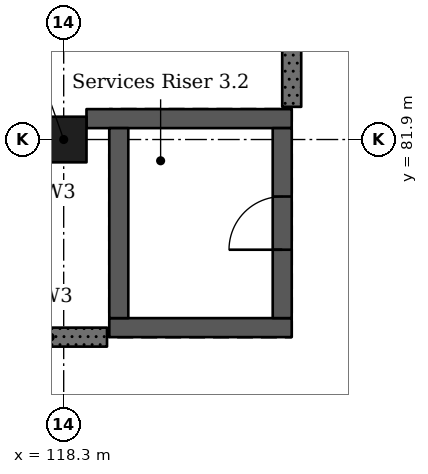
"""IFC4 building model, lengths in metres.
Left out: names, types, materials, properties, quantities, classifications, styles, units other than length and angle.
Written with IfcOpenShell. Run it as: python <this file> out.ifc"""

import sys

from ifc_helpers import new_model, si_unit, direction, frame, frame_2d, origin, origin_2d, place, context, subcontext, project, spatial, rectangle, extrude, element, fill, save


model = new_model("IFC4")
c1 = context("Model", 3, precision=1e-05, world=origin(), true_north=direction((0.0, 1.0)))
c2 = subcontext(c1, "Body", "Model", "MODEL_VIEW")
j1 = project(units=[si_unit("LENGTHUNIT", "METRE"), si_unit("PLANEANGLEUNIT", "RADIAN")], contexts=[c1])
p1 = place(None, origin())
s1 = spatial("IfcSite", under=j1, at=p1, CompositionType="ELEMENT")
p2 = place(p1, origin())
s2 = spatial("IfcBuilding", under=s1, at=p2, CompositionType="ELEMENT")
p3 = place(p2, frame((0.0, 0.0, 20.02)))
s3 = spatial("IfcBuildingStorey", under=s2, at=p3, CompositionType="ELEMENT", Elevation=20.02)
p4 = place(p3, frame((118.3, 81.9, 0.0), z_axis=(0.0, 0.0, 1.0), x_axis=(1.0, 0.0, 0.0)))
e1 = element("IfcColumn", 1, at=p4, inside=s3, PredefinedType="COLUMN", context=c2, shape_type="SweptSolid", body=[
    extrude(rectangle(XDim=0.6, YDim=0.6, at=origin_2d()), origin(), (0.0, 0.0, 1.0), 4.55),
])
p5 = place(p3, frame((121.3, 79.425, 0.0), z_axis=(0.0, 0.0, 1.0), x_axis=(-1.0, 0.0, 0.0)))
e2 = element("IfcWall", 2, at=p5, inside=s3, PredefinedType="SHEAR", context=c2, shape_type="SweptSolid", body=[
    extrude(rectangle(XDim=2.4, YDim=0.25, at=frame_2d((1.2, 0.0))), origin(), (0.0, 0.0, 1.0), 4.55),
])
p6 = place(p3, frame((121.3, 82.175, 0.0), z_axis=(0.0, 0.0, 1.0), x_axis=(-1.0, 0.0, 0.0)))
e3 = element("IfcWall", 3, at=p6, inside=s3, PredefinedType="SHEAR", context=c2, shape_type="SweptSolid", body=[
    extrude(rectangle(XDim=2.7, YDim=0.25, at=frame_2d((1.35, 0.0))), origin(), (0.0, 0.0, 1.0), 4.55),
])
p7 = place(p3, frame((119.025, 82.05, 0.0), z_axis=(0.0, 0.0, 1.0), x_axis=(0.0, -1.0, 0.0)))
e4 = element("IfcWall", 4, at=p7, inside=s3, PredefinedType="SHEAR", context=c2, shape_type="SweptSolid", body=[
    extrude(rectangle(XDim=2.5, YDim=0.25, at=frame_2d((1.25, 0.0))), origin(), (0.0, 0.0, 1.0), 4.55),
])
p8 = place(p3, frame((121.175, 82.05, 0.0), z_axis=(0.0, 0.0, 1.0), x_axis=(0.0, -1.0, 0.0)))
e5 = element("IfcWall", 5, at=p8, inside=s3, PredefinedType="SHEAR", context=c2, shape_type="SweptSolid", body=[
    extrude(rectangle(XDim=2.5, YDim=0.25, at=frame_2d((1.25, 0.0))), origin(), (0.0, 0.0, 1.0), 4.55),
])
p9 = place(p8, frame((0.9, 0.0, 0.0)))
e6 = element("IfcOpeningElement", 6, at=p9, cuts=e5, PredefinedType="OPENING", context=c2, shape_type="SweptSolid", body=[
    extrude(rectangle(XDim=0.7, YDim=2.1, at=frame_2d((0.35, 1.05))), frame((0.0, 0.135, 0.0), z_axis=(0.0, -1.0, 0.0), x_axis=(1.0, 0.0, 0.0)), (0.0, 0.0, 1.0), 0.27),
])
p10 = place(p3, frame((118.87, 79.3, 0.0), z_axis=(0.0, 0.0, 1.0), x_axis=(-1.0, 0.0, 0.0)))
e7 = element("IfcWall", 7, at=p10, inside=s3, PredefinedType="SOLIDWALL", context=c2, shape_type="SweptSolid", body=[
    extrude(rectangle(XDim=1.495, YDim=0.25, at=frame_2d((0.748, 0.0))), origin(), (0.0, 0.0, 1.0), 4.25),
])
p11 = place(p3, frame((121.3, 82.33, 0.0), z_axis=(0.0, 0.0, 1.0), x_axis=(0.0, 1.0, 0.0)))
e8 = element("IfcWall", 8, at=p11, inside=s3, PredefinedType="SOLIDWALL", context=c2, shape_type="SweptSolid", body=[
    extrude(rectangle(XDim=6.945, YDim=0.25, at=frame_2d((3.472, 0.0))), origin(), (0.0, 0.0, 1.0), 4.25),
])
p12 = place(p9, origin())
e9 = element("IfcDoor", 9, at=p12, inside=s3, OperationType="SINGLE_SWING_RIGHT", PredefinedType="DOOR", context=c2, shape_type="SweptSolid", body=[
    extrude(rectangle(XDim=0.7, YDim=2.1, at=frame_2d((0.35, 1.05))), frame((0.0, 0.025, 0.0), z_axis=(0.0, -1.0, 0.0), x_axis=(1.0, 0.0, 0.0)), (0.0, 0.0, 1.0), 0.05),
])
fill(e6, e9)
save(model, sys.argv[1])
